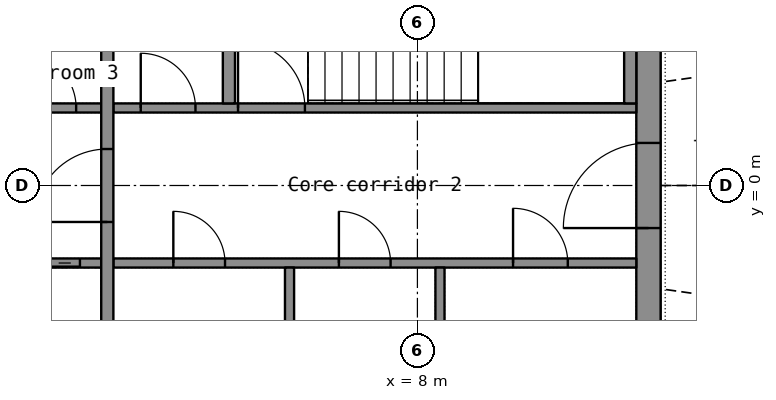
"""IFC4 building model, lengths in metres.
Left out: names, types, materials, properties, quantities, classifications, styles, units other than length and angle.
Written with IfcOpenShell. Run it as: python <this file> out.ifc"""

import sys

from ifc_helpers import new_model, si_unit, direction, frame, frame_2d, origin, place, context, subcontext, project, spatial, rectangle, extrude, element, fill, save


model = new_model("IFC4")
c1 = context("Model", 3, precision=1e-05, world=origin(), true_north=direction((0.0, 1.0)))
c2 = subcontext(c1, "Body", "Model", "MODEL_VIEW")
j1 = project(units=[si_unit("LENGTHUNIT", "METRE"), si_unit("PLANEANGLEUNIT", "RADIAN")], contexts=[c1])
p1 = place(None, origin())
s1 = spatial("IfcSite", under=j1, at=p1, CompositionType="ELEMENT")
p2 = place(p1, origin())
s2 = spatial("IfcBuilding", under=s1, at=p2, CompositionType="ELEMENT")
p3 = place(p2, frame((0.0, 0.0, 257.8)))
s3 = spatial("IfcBuildingStorey", under=s2, at=p3, CompositionType="ELEMENT", Elevation=257.8)
p4 = place(p3, frame((11.8, -7.2, 0.0), z_axis=(0.0, 0.0, 1.0), x_axis=(0.0, 1.0, 0.0)))
e1 = element("IfcWall", 1, at=p4, inside=s3, PredefinedType="SHEAR", context=c2, shape_type="SweptSolid", body=[
    extrude(rectangle(XDim=14.4, YDim=0.4, at=frame_2d((7.2, 0.0))), origin(), (0.0, 0.0, 1.0), 3.3),
])
p5 = place(p4, frame((6.5, 0.0, 0.0)))
e2 = element("IfcOpeningElement", 2, at=p5, cuts=e1, PredefinedType="OPENING", context=c2, shape_type="SweptSolid", body=[
    extrude(rectangle(XDim=1.4, YDim=2.2, at=frame_2d((0.7, 1.1))), frame((0.0, 0.21, 0.0), z_axis=(0.0, -1.0, 0.0), x_axis=(1.0, 0.0, 0.0)), (0.0, 0.0, 1.0), 0.42),
])
p6 = place(p3, frame((-2.8, -1.275, 0.0), z_axis=(0.0, 0.0, 1.0), x_axis=(1.0, 0.0, 0.0)))
e3 = element("IfcWall", 3, at=p6, inside=s3, PredefinedType="SHEAR", context=c2, shape_type="SweptSolid", body=[
    extrude(rectangle(XDim=5.6, YDim=0.15, at=frame_2d((2.8, 0.0))), origin(), (0.0, 0.0, 1.0), 3.3),
])
p7 = place(p6, frame((4.15, 0.0, 0.0)))
e4 = element("IfcOpeningElement", 4, at=p7, cuts=e3, PredefinedType="OPENING", context=c2, shape_type="SweptSolid", body=[
    extrude(rectangle(XDim=1.1, YDim=2.2, at=frame_2d((0.55, 1.1))), frame((0.0, 0.085, 0.0), z_axis=(0.0, -1.0, 0.0), x_axis=(1.0, 0.0, 0.0)), (0.0, 0.0, 1.0), 0.17),
])
p8 = place(p6, frame((0.499, 0.0, 0.0)))
e5 = element("IfcOpeningElement", 5, at=p8, cuts=e3, PredefinedType="OPENING", context=c2, shape_type="SweptSolid", body=[
    extrude(rectangle(XDim=0.9, YDim=2.1, at=frame_2d((0.45, 1.05))), frame((0.0, 0.085, 0.0), z_axis=(0.0, -1.0, 0.0), x_axis=(1.0, 0.0, 0.0)), (0.0, 0.0, 1.0), 0.17),
])
p9 = place(p6, frame((2.374, 0.0, 0.0)))
e6 = element("IfcOpeningElement", 6, at=p9, cuts=e3, PredefinedType="OPENING", context=c2, shape_type="SweptSolid", body=[
    extrude(rectangle(XDim=0.9, YDim=2.1, at=frame_2d((0.45, 1.05))), frame((0.0, 0.085, 0.0), z_axis=(0.0, -1.0, 0.0), x_axis=(1.0, 0.0, 0.0)), (0.0, 0.0, 1.0), 0.17),
])
p10 = place(p3, frame((3.0, -1.275, 0.0), z_axis=(0.0, 0.0, 1.0), x_axis=(1.0, 0.0, 0.0)))
e7 = element("IfcWall", 7, at=p10, inside=s3, PredefinedType="PARTITIONING", context=c2, shape_type="SweptSolid", body=[
    extrude(rectangle(XDim=8.6, YDim=0.15, at=frame_2d((4.3, 0.0))), origin(), (0.0, 0.0, 1.0), 3.3),
])
p11 = place(p10, frame((0.986, 0.0, 0.0)))
e8 = element("IfcOpeningElement", 8, at=p11, cuts=e7, PredefinedType="OPENING", context=c2, shape_type="SweptSolid", body=[
    extrude(rectangle(XDim=0.85, YDim=2.1, at=frame_2d((0.425, 1.05))), frame((0.0, 0.085, 0.0), z_axis=(0.0, -1.0, 0.0), x_axis=(1.0, 0.0, 0.0)), (0.0, 0.0, 1.0), 0.17),
])
p12 = place(p10, frame((3.709, 0.0, 0.0)))
e9 = element("IfcOpeningElement", 9, at=p12, cuts=e7, PredefinedType="OPENING", context=c2, shape_type="SweptSolid", body=[
    extrude(rectangle(XDim=0.85, YDim=2.1, at=frame_2d((0.425, 1.05))), frame((0.0, 0.085, 0.0), z_axis=(0.0, -1.0, 0.0), x_axis=(1.0, 0.0, 0.0)), (0.0, 0.0, 1.0), 0.17),
])
p13 = place(p10, frame((6.573, 0.0, 0.0)))
e10 = element("IfcOpeningElement", 10, at=p13, cuts=e7, PredefinedType="OPENING", context=c2, shape_type="SweptSolid", body=[
    extrude(rectangle(XDim=0.9, YDim=2.1, at=frame_2d((0.45, 1.05))), frame((0.0, 0.085, 0.0), z_axis=(0.0, -1.0, 0.0), x_axis=(1.0, 0.0, 0.0)), (0.0, 0.0, 1.0), 0.17),
])
p14 = place(p3, frame((-2.8, 1.275, 0.0), z_axis=(0.0, 0.0, 1.0), x_axis=(1.0, 0.0, 0.0)))
e11 = element("IfcWall", 11, at=p14, inside=s3, PredefinedType="SHEAR", context=c2, shape_type="SweptSolid", body=[
    extrude(rectangle(XDim=5.6, YDim=0.15, at=frame_2d((2.8, 0.0))), origin(), (0.0, 0.0, 1.0), 3.3),
])
p15 = place(p14, frame((0.35, 0.0, 0.0)))
e12 = element("IfcOpeningElement", 12, at=p15, cuts=e11, PredefinedType="OPENING", context=c2, shape_type="SweptSolid", body=[
    extrude(rectangle(XDim=1.1, YDim=2.2, at=frame_2d((0.55, 1.1))), frame((0.0, 0.085, 0.0), z_axis=(0.0, -1.0, 0.0), x_axis=(1.0, 0.0, 0.0)), (0.0, 0.0, 1.0), 0.17),
])
p16 = place(p14, frame((2.413, 0.0, 0.0)))
e13 = element("IfcOpeningElement", 13, at=p16, cuts=e11, PredefinedType="OPENING", context=c2, shape_type="SweptSolid", body=[
    extrude(rectangle(XDim=0.9, YDim=2.1, at=frame_2d((0.45, 1.05))), frame((0.0, 0.085, 0.0), z_axis=(0.0, -1.0, 0.0), x_axis=(1.0, 0.0, 0.0)), (0.0, 0.0, 1.0), 0.17),
])
p17 = place(p14, frame((4.288, 0.0, 0.0)))
e14 = element("IfcOpeningElement", 14, at=p17, cuts=e11, PredefinedType="OPENING", context=c2, shape_type="SweptSolid", body=[
    extrude(rectangle(XDim=0.9, YDim=2.1, at=frame_2d((0.45, 1.05))), frame((0.0, 0.085, 0.0), z_axis=(0.0, -1.0, 0.0), x_axis=(1.0, 0.0, 0.0)), (0.0, 0.0, 1.0), 0.17),
])
p18 = place(p3, frame((3.0, 1.275, 0.0), z_axis=(0.0, 0.0, 1.0), x_axis=(1.0, 0.0, 0.0)))
e15 = element("IfcWall", 15, at=p18, inside=s3, PredefinedType="SHEAR", context=c2, shape_type="SweptSolid", body=[
    extrude(rectangle(XDim=8.6, YDim=0.15, at=frame_2d((4.3, 0.0))), origin(), (0.0, 0.0, 1.0), 3.3),
])
p19 = place(p18, frame((2.05, 0.0, 0.0)))
e16 = element("IfcOpeningElement", 16, at=p19, cuts=e15, PredefinedType="OPENING", context=c2, shape_type="SweptSolid", body=[
    extrude(rectangle(XDim=1.1, YDim=2.15, at=frame_2d((0.55, 1.075))), frame((0.0, 0.085, 0.0), z_axis=(0.0, -1.0, 0.0), x_axis=(1.0, 0.0, 0.0)), (0.0, 0.0, 1.0), 0.17),
])
p20 = place(p18, frame((0.45, 0.0, 0.0)))
e17 = element("IfcOpeningElement", 17, at=p20, cuts=e15, PredefinedType="OPENING", context=c2, shape_type="SweptSolid", body=[
    extrude(rectangle(XDim=0.9, YDim=2.1, at=frame_2d((0.45, 1.05))), frame((0.0, 0.085, 0.0), z_axis=(0.0, -1.0, 0.0), x_axis=(1.0, 0.0, 0.0)), (0.0, 0.0, 1.0), 0.17),
])
p21 = place(p3, frame((2.9, -3.7, 0.0), z_axis=(0.0, 0.0, 1.0), x_axis=(0.0, 1.0, 0.0)))
e18 = element("IfcWall", 18, at=p21, inside=s3, PredefinedType="SHEAR", context=c2, shape_type="SweptSolid", body=[
    extrude(rectangle(XDim=7.4, YDim=0.2, at=frame_2d((3.7, 0.0))), origin(), (0.0, 0.0, 1.0), 3.3),
])
p22 = place(p21, frame((3.1, 0.0, 0.0)))
e19 = element("IfcOpeningElement", 19, at=p22, cuts=e18, PredefinedType="OPENING", context=c2, shape_type="SweptSolid", body=[
    extrude(rectangle(XDim=1.2, YDim=2.2, at=frame_2d((0.6, 1.1))), frame((0.0, 0.11, 0.0), z_axis=(0.0, -1.0, 0.0), x_axis=(1.0, 0.0, 0.0)), (0.0, 0.0, 1.0), 0.22),
])
for number, where, z_axis, x_axis in (
    (20, (11.5, 1.35, 0.0), (0.0, 0.0, 1.0), (0.0, 1.0, 0.0)),
    (21, (4.9, 1.35, 0.0), (0.0, 0.0, 1.0), (0.0, 1.0, 0.0)),
):
    element("IfcWall", number, at=place(p3, frame(where, z_axis=z_axis, x_axis=x_axis)), inside=s3, PredefinedType="SHEAR", context=c2, shape_type="SweptSolid", body=[
        extrude(rectangle(XDim=2.35, YDim=0.2, at=frame_2d((1.175, 0.0))), origin(), (0.0, 0.0, 1.0), 3.3),
    ])
for number, where, z_axis, x_axis in (
    (22, (5.897, -3.7, 0.0), (0.0, 0.0, 1.0), (0.0, 1.0, 0.0)),
    (23, (8.371, -3.7, 0.0), (0.0, 0.0, 1.0), (0.0, 1.0, 0.0)),
):
    element("IfcWall", number, at=place(p3, frame(where, z_axis=z_axis, x_axis=x_axis)), inside=s3, PredefinedType="PARTITIONING", context=c2, shape_type="SweptSolid", body=[
        extrude(rectangle(XDim=2.35, YDim=0.15, at=frame_2d((1.175, 0.0))), origin(), (0.0, 0.0, 1.0), 3.3),
    ])
p23 = place(p5, origin())
e24 = element("IfcDoor", 24, at=p23, inside=s3, OperationType="DOUBLE_DOOR_SINGLE_SWING", PredefinedType="DOOR", context=c2, shape_type="SweptSolid", body=[
    extrude(rectangle(XDim=1.4, YDim=2.2, at=frame_2d((0.7, 1.1))), frame((0.0, 0.025, 0.0), z_axis=(0.0, -1.0, 0.0), x_axis=(1.0, 0.0, 0.0)), (0.0, 0.0, 1.0), 0.05),
])
fill(e2, e24)
p24 = place(p22, origin())
e25 = element("IfcDoor", 25, at=p24, inside=s3, OperationType="SINGLE_SWING_LEFT", PredefinedType="DOOR", context=c2, shape_type="SweptSolid", body=[
    extrude(rectangle(XDim=1.2, YDim=2.2, at=frame_2d((0.6, 1.1))), frame((0.0, 0.025, 0.0), z_axis=(0.0, -1.0, 0.0), x_axis=(1.0, 0.0, 0.0)), (0.0, 0.0, 1.0), 0.05),
])
fill(e19, e25)
p25 = place(p7, origin())
e26 = element("IfcDoor", 26, at=p25, inside=s3, OperationType="DOUBLE_DOOR_SLIDING", PredefinedType="DOOR", context=c2, shape_type="SweptSolid", body=[
    extrude(rectangle(XDim=1.1, YDim=2.2, at=frame_2d((0.55, 1.1))), frame((0.0, 0.025, 0.0), z_axis=(0.0, -1.0, 0.0), x_axis=(1.0, 0.0, 0.0)), (0.0, 0.0, 1.0), 0.05),
])
fill(e4, e26)
p26 = place(p19, origin())
e27 = element("IfcDoor", 27, at=p26, inside=s3, OperationType="SINGLE_SWING_LEFT", PredefinedType="DOOR", context=c2, shape_type="SweptSolid", body=[
    extrude(rectangle(XDim=1.1, YDim=2.15, at=frame_2d((0.55, 1.075))), frame((0.0, 0.025, 0.0), z_axis=(0.0, -1.0, 0.0), x_axis=(1.0, 0.0, 0.0)), (0.0, 0.0, 1.0), 0.05),
])
fill(e16, e27)
p27 = place(p11, origin())
e28 = element("IfcDoor", 28, at=p27, inside=s3, OperationType="SINGLE_SWING_LEFT", PredefinedType="DOOR", context=c2, shape_type="SweptSolid", body=[
    extrude(rectangle(XDim=0.85, YDim=2.1, at=frame_2d((0.425, 1.05))), frame((0.0, 0.025, 0.0), z_axis=(0.0, -1.0, 0.0), x_axis=(1.0, 0.0, 0.0)), (0.0, 0.0, 1.0), 0.05),
])
fill(e8, e28)
p28 = place(p12, origin())
e29 = element("IfcDoor", 29, at=p28, inside=s3, OperationType="SINGLE_SWING_LEFT", PredefinedType="DOOR", context=c2, shape_type="SweptSolid", body=[
    extrude(rectangle(XDim=0.85, YDim=2.1, at=frame_2d((0.425, 1.05))), frame((0.0, 0.025, 0.0), z_axis=(0.0, -1.0, 0.0), x_axis=(1.0, 0.0, 0.0)), (0.0, 0.0, 1.0), 0.05),
])
fill(e9, e29)
p29 = place(p13, origin())
e30 = element("IfcDoor", 30, at=p29, inside=s3, OperationType="SINGLE_SWING_LEFT", PredefinedType="DOOR", context=c2, shape_type="SweptSolid", body=[
    extrude(rectangle(XDim=0.9, YDim=2.1, at=frame_2d((0.45, 1.05))), frame((0.0, 0.025, 0.0), z_axis=(0.0, -1.0, 0.0), x_axis=(1.0, 0.0, 0.0)), (0.0, 0.0, 1.0), 0.05),
])
fill(e10, e30)
p30 = place(p17, origin())
e31 = element("IfcDoor", 31, at=p30, inside=s3, OperationType="SINGLE_SWING_LEFT", PredefinedType="DOOR", context=c2, shape_type="SweptSolid", body=[
    extrude(rectangle(XDim=0.9, YDim=2.1, at=frame_2d((0.45, 1.05))), frame((0.0, 0.025, 0.0), z_axis=(0.0, -1.0, 0.0), x_axis=(1.0, 0.0, 0.0)), (0.0, 0.0, 1.0), 0.05),
])
fill(e14, e31)
p31 = place(p20, origin())
e32 = element("IfcDoor", 32, at=p31, inside=s3, OperationType="SINGLE_SWING_LEFT", PredefinedType="DOOR", context=c2, shape_type="SweptSolid", body=[
    extrude(rectangle(XDim=0.9, YDim=2.1, at=frame_2d((0.45, 1.05))), frame((0.0, 0.025, 0.0), z_axis=(0.0, -1.0, 0.0), x_axis=(1.0, 0.0, 0.0)), (0.0, 0.0, 1.0), 0.05),
])
fill(e17, e32)
save(model, sys.argv[1])
